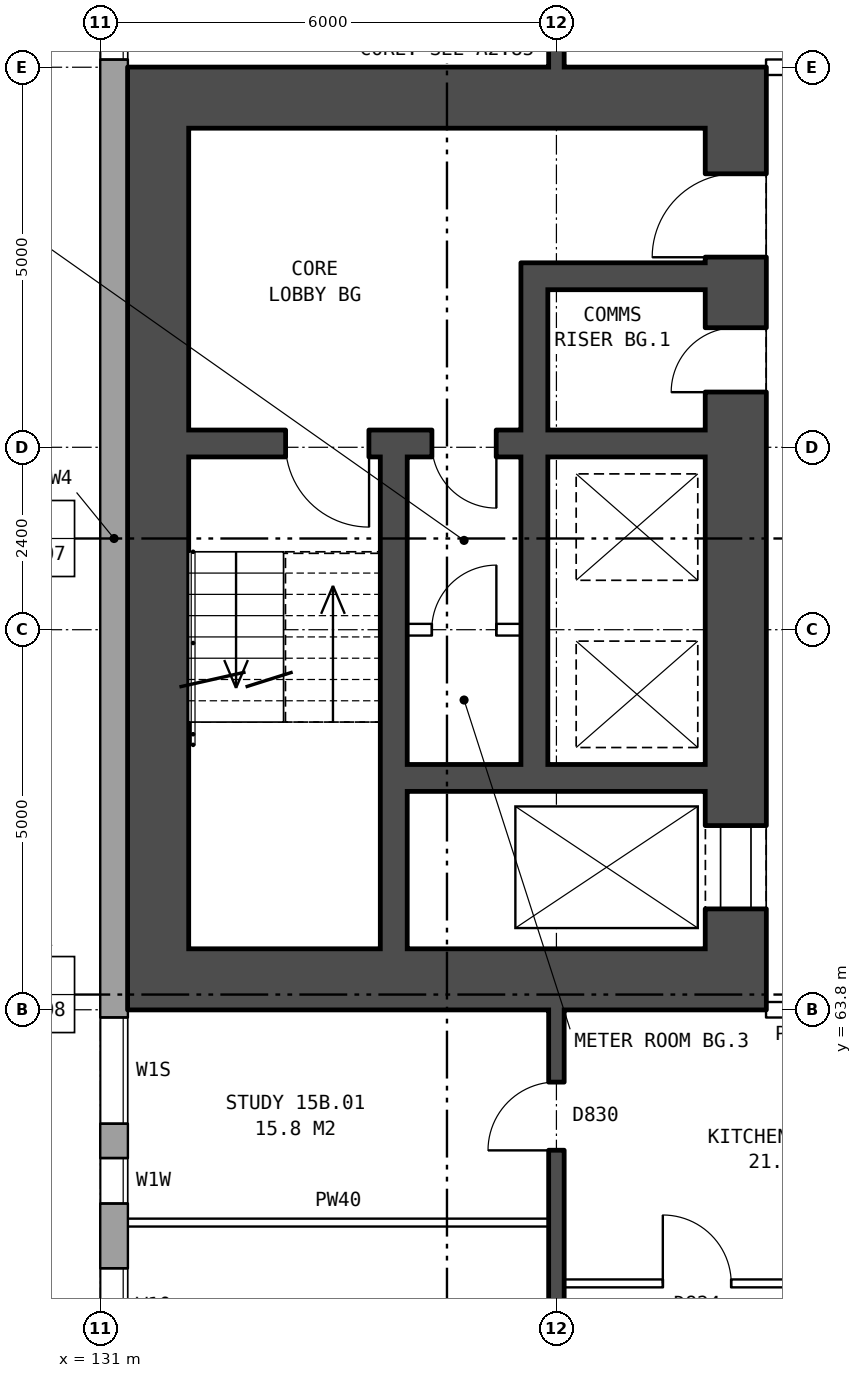
"""IFC4 building model, lengths in metres.
Left out: names, types, materials, properties, quantities, classifications, styles, units other than length and angle.
Written with IfcOpenShell. Run it as: python <this file> out.ifc"""

import sys

from ifc_helpers import new_model, si_unit, direction, frame, frame_2d, origin, place, context, subcontext, project, spatial, rectangle, extrude, element, fill, save


model = new_model("IFC4")
c1 = context("Model", 3, precision=1e-05, world=origin(), true_north=direction((0.0, 1.0)))
c2 = subcontext(c1, "Body", "Model", "MODEL_VIEW")
j1 = project(units=[si_unit("LENGTHUNIT", "METRE"), si_unit("PLANEANGLEUNIT", "RADIAN")], contexts=[c1])
p1 = place(None, origin())
s1 = spatial("IfcSite", under=j1, at=p1, CompositionType="ELEMENT")
p2 = place(p1, origin())
s2 = spatial("IfcBuilding", under=s1, at=p2, CompositionType="ELEMENT")
p3 = place(p2, frame((0.0, 0.0, 56.7)))
s3 = spatial("IfcBuildingStorey", under=s2, at=p3, CompositionType="ELEMENT", Elevation=56.7)
p4 = place(p3, frame((131.18, 82.925, 0.0), z_axis=(0.0, 0.0, 1.0), x_axis=(0.0, -1.0, 0.0)))
e1 = element("IfcWall", 1, at=p4, inside=s3, PredefinedType="STANDARD", context=c2, shape_type="SweptSolid", body=[
    extrude(rectangle(XDim=25.851, YDim=0.36, at=frame_2d((12.925, 0.0))), origin(), (0.0, 0.0, 1.0), 2.85),
])
p5 = place(p4, frame((1.075, 0.0, 0.8)))
e2 = element("IfcOpeningElement", 2, at=p5, cuts=e1, PredefinedType="OPENING", context=c2, shape_type="SweptSolid", body=[
    extrude(rectangle(XDim=1.2, YDim=1.8, at=frame_2d((0.6, 0.9))), frame((0.0, 0.19, 0.0), z_axis=(0.0, -1.0, 0.0), x_axis=(1.0, 0.0, 0.0)), (0.0, 0.0, 1.0), 0.38),
])
p6 = place(p4, frame((2.575, 0.0, 0.8)))
e3 = element("IfcOpeningElement", 3, at=p6, cuts=e1, PredefinedType="OPENING", context=c2, shape_type="SweptSolid", body=[
    extrude(rectangle(XDim=1.2, YDim=0.9, at=frame_2d((0.6, 0.45))), frame((0.0, 0.19, 0.0), z_axis=(0.0, -1.0, 0.0), x_axis=(1.0, 0.0, 0.0)), (0.0, 0.0, 1.0), 0.38),
])
p7 = place(p4, frame((19.225, 0.0, 1.65)))
e4 = element("IfcOpeningElement", 4, at=p7, cuts=e1, PredefinedType="OPENING", context=c2, shape_type="SweptSolid", body=[
    extrude(rectangle(XDim=1.4, YDim=0.9, at=frame_2d((0.7, 0.45))), frame((0.0, 0.19, 0.0), z_axis=(0.0, -1.0, 0.0), x_axis=(1.0, 0.0, 0.0)), (0.0, 0.0, 1.0), 0.38),
])
p8 = place(p4, frame((22.525, 0.0, 0.8)))
e5 = element("IfcOpeningElement", 5, at=p8, cuts=e1, PredefinedType="OPENING", context=c2, shape_type="SweptSolid", body=[
    extrude(rectangle(XDim=1.0, YDim=1.2, at=frame_2d((0.5, 0.6))), frame((0.0, 0.19, 0.0), z_axis=(0.0, -1.0, 0.0), x_axis=(1.0, 0.0, 0.0)), (0.0, 0.0, 1.0), 0.38),
])
p9 = place(p4, frame((5.025, 0.0, 1.7)))
e6 = element("IfcOpeningElement", 6, at=p9, cuts=e1, PredefinedType="OPENING", context=c2, shape_type="SweptSolid", body=[
    extrude(rectangle(XDim=1.6, YDim=0.9, at=frame_2d((0.8, 0.45))), frame((0.0, 0.19, 0.0), z_axis=(0.0, -1.0, 0.0), x_axis=(1.0, 0.0, 0.0)), (0.0, 0.0, 1.0), 0.38),
])
p10 = place(p4, frame((21.075, 0.0, 0.25)))
e7 = element("IfcOpeningElement", 7, at=p10, cuts=e1, PredefinedType="OPENING", context=c2, shape_type="SweptSolid", body=[
    extrude(rectangle(XDim=0.6, YDim=0.9, at=frame_2d((0.3, 0.45))), frame((0.0, 0.19, 0.0), z_axis=(0.0, -1.0, 0.0), x_axis=(1.0, 0.0, 0.0)), (0.0, 0.0, 1.0), 0.38),
])
p11 = place(p4, frame((23.825, 0.0, 0.8)))
e8 = element("IfcOpeningElement", 8, at=p11, cuts=e1, PredefinedType="OPENING", context=c2, shape_type="SweptSolid", body=[
    extrude(rectangle(XDim=1.4, YDim=1.8, at=frame_2d((0.7, 0.9))), frame((0.0, 0.19, 0.0), z_axis=(0.0, -1.0, 0.0), x_axis=(1.0, 0.0, 0.0)), (0.0, 0.0, 1.0), 0.38),
])
p12 = place(p3, frame((139.36, 64.6, 0.0), z_axis=(0.0, 0.0, 1.0), x_axis=(0.0, 1.0, 0.0)))
e9 = element("IfcWall", 9, at=p12, inside=s3, PredefinedType="SHEAR", context=c2, shape_type="SweptSolid", body=[
    extrude(rectangle(XDim=10.8, YDim=0.8, at=frame_2d((5.4, 0.0))), origin(), (0.0, 0.0, 1.0), 2.85),
])
p13 = place(p12, frame((0.525, 0.0, 0.0)))
e10 = element("IfcOpeningElement", 10, at=p13, cuts=e9, PredefinedType="OPENING", context=c2, shape_type="SweptSolid", body=[
    extrude(rectangle(XDim=1.1, YDim=2.1, at=frame_2d((0.55, 1.05))), frame((0.0, 0.41, 0.0), z_axis=(0.0, -1.0, 0.0), x_axis=(1.0, 0.0, 0.0)), (0.0, 0.0, 1.0), 0.82),
])
p14 = place(p12, frame((9.1, 0.0, 0.0)))
e11 = element("IfcOpeningElement", 11, at=p14, cuts=e9, PredefinedType="OPENING", context=c2, shape_type="SweptSolid", body=[
    extrude(rectangle(XDim=1.1, YDim=2.1, at=frame_2d((0.55, 1.05))), frame((0.0, 0.41, 0.0), z_axis=(0.0, -1.0, 0.0), x_axis=(1.0, 0.0, 0.0)), (0.0, 0.0, 1.0), 0.82),
])
p15 = place(p12, frame((7.325, 0.0, 0.0)))
e12 = element("IfcOpeningElement", 12, at=p15, cuts=e9, PredefinedType="OPENING", context=c2, shape_type="SweptSolid", body=[
    extrude(rectangle(XDim=0.85, YDim=2.1, at=frame_2d((0.425, 1.05))), frame((0.0, 0.41, 0.0), z_axis=(0.0, -1.0, 0.0), x_axis=(1.0, 0.0, 0.0)), (0.0, 0.0, 1.0), 0.82),
])
p16 = place(p3, frame((131.76, 64.6, 0.0), z_axis=(0.0, 0.0, 1.0), x_axis=(0.0, 1.0, 0.0)))
e13 = element("IfcWall", 13, at=p16, inside=s3, PredefinedType="SHEAR", context=c2, shape_type="SweptSolid", body=[
    extrude(rectangle(XDim=10.8, YDim=0.8, at=frame_2d((5.4, 0.0))), origin(), (0.0, 0.0, 1.0), 2.85),
])
for number, where, z_axis, x_axis in (
    (14, (139.76, 64.2, 0.0), (0.0, 0.0, 1.0), (-1.0, 0.0, 0.0)),
    (15, (139.76, 75.8, 0.0), (0.0, 0.0, 1.0), (-1.0, 0.0, 0.0)),
):
    element("IfcWall", number, at=place(p3, frame(where, z_axis=z_axis, x_axis=x_axis)), inside=s3, PredefinedType="SHEAR", context=c2, shape_type="SweptSolid", body=[
        extrude(rectangle(XDim=8.4, YDim=0.8, at=frame_2d((4.2, 0.0))), origin(), (0.0, 0.0, 1.0), 2.85),
    ])
p17 = place(p3, frame((138.96, 66.85, 0.0), z_axis=(0.0, 0.0, 1.0), x_axis=(-1.0, 0.0, 0.0)))
e16 = element("IfcWall", 16, at=p17, inside=s3, PredefinedType="SHEAR", context=c2, shape_type="SweptSolid", body=[
    extrude(rectangle(XDim=3.925, YDim=0.35, at=frame_2d((1.962, 0.0))), origin(), (0.0, 0.0, 1.0), 2.85),
])
p18 = place(p3, frame((136.535, 68.8, 0.0), z_axis=(0.0, 0.0, 1.0), x_axis=(-1.0, 0.0, 0.0)))
e17 = element("IfcWall", 17, at=p18, inside=s3, PredefinedType="PARTITIONING", context=c2, shape_type="SweptSolid", body=[
    extrude(rectangle(XDim=1.5, YDim=0.15, at=frame_2d((0.75, 0.0))), origin(), (0.0, 0.0, 1.0), 2.85),
])
p19 = place(p18, frame((0.325, 0.0, 0.0)))
e18 = element("IfcOpeningElement", 18, at=p19, cuts=e17, PredefinedType="OPENING", context=c2, shape_type="SweptSolid", body=[
    extrude(rectangle(XDim=0.85, YDim=2.1, at=frame_2d((0.425, 1.05))), frame((0.0, 0.085, 0.0), z_axis=(0.0, -1.0, 0.0), x_axis=(1.0, 0.0, 0.0)), (0.0, 0.0, 1.0), 0.17),
])
p20 = place(p3, frame((138.96, 71.25, 0.0), z_axis=(0.0, 0.0, 1.0), x_axis=(-1.0, 0.0, 0.0)))
e19 = element("IfcWall", 19, at=p20, inside=s3, PredefinedType="SHEAR", context=c2, shape_type="SweptSolid", body=[
    extrude(rectangle(XDim=6.8, YDim=0.35, at=frame_2d((3.4, 0.0))), origin(), (0.0, 0.0, 1.0), 2.85),
])
p21 = place(p20, frame((4.425, 0.0, 0.0)))
e20 = element("IfcOpeningElement", 20, at=p21, cuts=e19, PredefinedType="OPENING", context=c2, shape_type="SweptSolid", body=[
    extrude(rectangle(XDim=1.1, YDim=2.1, at=frame_2d((0.55, 1.05))), frame((0.0, 0.185, 0.0), z_axis=(0.0, -1.0, 0.0), x_axis=(1.0, 0.0, 0.0)), (0.0, 0.0, 1.0), 0.37),
])
p22 = place(p20, frame((2.75, 0.0, 0.0)))
e21 = element("IfcOpeningElement", 21, at=p22, cuts=e19, PredefinedType="OPENING", context=c2, shape_type="SweptSolid", body=[
    extrude(rectangle(XDim=0.85, YDim=2.1, at=frame_2d((0.425, 1.05))), frame((0.0, 0.185, 0.0), z_axis=(0.0, -1.0, 0.0), x_axis=(1.0, 0.0, 0.0)), (0.0, 0.0, 1.0), 0.37),
])
p23 = place(p3, frame((138.96, 73.45, 0.0), z_axis=(0.0, 0.0, 1.0), x_axis=(-1.0, 0.0, 0.0)))
e22 = element("IfcWall", 22, at=p23, inside=s3, PredefinedType="SHEAR", context=c2, shape_type="SweptSolid", body=[
    extrude(rectangle(XDim=2.075, YDim=0.35, at=frame_2d((1.038, 0.0))), origin(), (0.0, 0.0, 1.0), 2.85),
])
p24 = place(p3, frame((136.71, 67.025, 0.0), z_axis=(0.0, 0.0, 1.0), x_axis=(0.0, 1.0, 0.0)))
e23 = element("IfcWall", 23, at=p24, inside=s3, PredefinedType="SHEAR", context=c2, shape_type="SweptSolid", body=[
    extrude(rectangle(XDim=4.05, YDim=0.35, at=frame_2d((2.025, 0.0))), origin(), (0.0, 0.0, 1.0), 2.85),
])
p25 = place(p3, frame((136.71, 71.425, 0.0), z_axis=(0.0, 0.0, 1.0), x_axis=(0.0, 1.0, 0.0)))
e24 = element("IfcWall", 24, at=p25, inside=s3, PredefinedType="SHEAR", context=c2, shape_type="SweptSolid", body=[
    extrude(rectangle(XDim=2.2, YDim=0.35, at=frame_2d((1.1, 0.0))), origin(), (0.0, 0.0, 1.0), 2.85),
])
p26 = place(p3, frame((134.86, 64.6, 0.0), z_axis=(0.0, 0.0, 1.0), x_axis=(0.0, 1.0, 0.0)))
e25 = element("IfcWall", 25, at=p26, inside=s3, PredefinedType="SHEAR", context=c2, shape_type="SweptSolid", body=[
    extrude(rectangle(XDim=6.475, YDim=0.35, at=frame_2d((3.237, 0.0))), origin(), (0.0, 0.0, 1.0), 2.85),
])
p27 = place(p3, frame((137.1, 60.2, 0.0), z_axis=(0.0, 0.0, 1.0), x_axis=(1.0, 0.0, 0.0)))
e26 = element("IfcWall", 26, at=p27, inside=s3, PredefinedType="PARTITIONING", context=c2, shape_type="SweptSolid", body=[
    extrude(rectangle(XDim=5.8, YDim=0.1, at=frame_2d((2.9, 0.0))), origin(), (0.0, 0.0, 1.0), 2.85),
])
p28 = place(p27, frame((1.3, 0.0, 0.0)))
e27 = element("IfcOpeningElement", 27, at=p28, cuts=e26, PredefinedType="OPENING", context=c2, shape_type="SweptSolid", body=[
    extrude(rectangle(XDim=0.9, YDim=2.1, at=frame_2d((0.45, 1.05))), frame((0.0, 0.06, 0.0), z_axis=(0.0, -1.0, 0.0), x_axis=(1.0, 0.0, 0.0)), (0.0, 0.0, 1.0), 0.12),
])
p29 = place(p27, frame((4.2, 0.0, 0.0)))
e28 = element("IfcOpeningElement", 28, at=p29, cuts=e26, PredefinedType="OPENING", context=c2, shape_type="SweptSolid", body=[
    extrude(rectangle(XDim=0.9, YDim=2.1, at=frame_2d((0.45, 1.05))), frame((0.0, 0.06, 0.0), z_axis=(0.0, -1.0, 0.0), x_axis=(1.0, 0.0, 0.0)), (0.0, 0.0, 1.0), 0.12),
])
p30 = place(p3, frame((131.36, 61.0, 0.0), z_axis=(0.0, 0.0, 1.0), x_axis=(1.0, 0.0, 0.0)))
e29 = element("IfcWall", 29, at=p30, inside=s3, PredefinedType="PARTITIONING", context=c2, shape_type="SweptSolid", body=[
    extrude(rectangle(XDim=5.54, YDim=0.1, at=frame_2d((2.77, 0.0))), origin(), (0.0, 0.0, 1.0), 2.85),
])
p31 = place(p3, frame((139.76, 63.8, 0.0), z_axis=(0.0, 0.0, 1.0), x_axis=(1.0, 0.0, 0.0)))
e30 = element("IfcWall", 30, at=p31, inside=s3, PredefinedType="PARTITIONING", context=c2, shape_type="SweptSolid", body=[
    extrude(rectangle(XDim=3.0, YDim=0.2, at=frame_2d((1.5, 0.0))), origin(), (0.0, 0.0, 1.0), 2.85),
])
p32 = place(p31, frame((1.0, 0.0, 0.0)))
e31 = element("IfcOpeningElement", 31, at=p32, cuts=e30, PredefinedType="OPENING", context=c2, shape_type="SweptSolid", body=[
    extrude(rectangle(XDim=1.0, YDim=2.1, at=frame_2d((0.5, 1.05))), frame((0.0, 0.11, 0.0), z_axis=(0.0, -1.0, 0.0), x_axis=(1.0, 0.0, 0.0)), (0.0, 0.0, 1.0), 0.22),
])
p33 = place(p3, frame((139.76, 76.2, 0.0), z_axis=(0.0, 0.0, 1.0), x_axis=(1.0, 0.0, 0.0)))
e32 = element("IfcWall", 32, at=p33, inside=s3, PredefinedType="PARTITIONING", context=c2, shape_type="SweptSolid", body=[
    extrude(rectangle(XDim=3.0, YDim=0.2, at=frame_2d((1.5, 0.0))), origin(), (0.0, 0.0, 1.0), 2.85),
])
p34 = place(p33, frame((1.0, 0.0, 0.0)))
e33 = element("IfcOpeningElement", 33, at=p34, cuts=e32, PredefinedType="OPENING", context=c2, shape_type="SweptSolid", body=[
    extrude(rectangle(XDim=1.0, YDim=2.1, at=frame_2d((0.5, 1.05))), frame((0.0, 0.11, 0.0), z_axis=(0.0, -1.0, 0.0), x_axis=(1.0, 0.0, 0.0)), (0.0, 0.0, 1.0), 0.22),
])
p35 = place(p3, frame((137.0, 54.36, 0.0), z_axis=(0.0, 0.0, 1.0), x_axis=(0.0, 1.0, 0.0)))
e34 = element("IfcWall", 34, at=p35, inside=s3, PredefinedType="SOLIDWALL", context=c2, shape_type="SweptSolid", body=[
    extrude(rectangle(XDim=9.44, YDim=0.2, at=frame_2d((4.72, 0.0))), origin(), (0.0, 0.0, 1.0), 2.85),
])
p36 = place(p35, frame((2.47, 0.0, 0.0)))
e35 = element("IfcOpeningElement", 35, at=p36, cuts=e34, PredefinedType="OPENING", context=c2, shape_type="SweptSolid", body=[
    extrude(rectangle(XDim=0.9, YDim=2.1, at=frame_2d((0.45, 1.05))), frame((0.0, 0.11, 0.0), z_axis=(0.0, -1.0, 0.0), x_axis=(1.0, 0.0, 0.0)), (0.0, 0.0, 1.0), 0.22),
])
p37 = place(p35, frame((7.59, 0.0, 0.0)))
e36 = element("IfcOpeningElement", 36, at=p37, cuts=e34, PredefinedType="OPENING", context=c2, shape_type="SweptSolid", body=[
    extrude(rectangle(XDim=0.9, YDim=2.1, at=frame_2d((0.45, 1.05))), frame((0.0, 0.11, 0.0), z_axis=(0.0, -1.0, 0.0), x_axis=(1.0, 0.0, 0.0)), (0.0, 0.0, 1.0), 0.22),
])
p38 = place(p3, frame((137.0, 76.2, 0.0), z_axis=(0.0, 0.0, 1.0), x_axis=(0.0, 1.0, 0.0)))
e37 = element("IfcWall", 37, at=p38, inside=s3, PredefinedType="SOLIDWALL", context=c2, shape_type="SweptSolid", body=[
    extrude(rectangle(XDim=9.44, YDim=0.2, at=frame_2d((4.72, 0.0))), origin(), (0.0, 0.0, 1.0), 2.85),
])
p39 = place(p38, frame((1.5, 0.0, 0.0)))
e38 = element("IfcOpeningElement", 38, at=p39, cuts=e37, PredefinedType="OPENING", context=c2, shape_type="SweptSolid", body=[
    extrude(rectangle(XDim=0.9, YDim=2.1, at=frame_2d((0.45, 1.05))), frame((0.0, 0.11, 0.0), z_axis=(0.0, -1.0, 0.0), x_axis=(1.0, 0.0, 0.0)), (0.0, 0.0, 1.0), 0.22),
])
p40 = place(p7, origin())
e39 = element("IfcWindow", 39, at=p40, inside=s3, PartitioningType="SINGLE_PANEL", PredefinedType="WINDOW", context=c2, shape_type="SweptSolid", body=[
    extrude(rectangle(XDim=1.4, YDim=0.9, at=frame_2d((0.7, 0.45))), frame((0.0, 0.15, 0.0), z_axis=(0.0, -1.0, 0.0), x_axis=(1.0, 0.0, 0.0)), (0.0, 0.0, 1.0), 0.06),
])
fill(e4, e39)
p41 = place(p8, origin())
e40 = element("IfcWindow", 40, at=p41, inside=s3, PartitioningType="SINGLE_PANEL", PredefinedType="WINDOW", context=c2, shape_type="SweptSolid", body=[
    extrude(rectangle(XDim=1.0, YDim=1.2, at=frame_2d((0.5, 0.6))), frame((0.0, 0.15, 0.0), z_axis=(0.0, -1.0, 0.0), x_axis=(1.0, 0.0, 0.0)), (0.0, 0.0, 1.0), 0.06),
])
fill(e5, e40)
p42 = place(p13, origin())
e41 = element("IfcDoor", 41, at=p42, inside=s3, OperationType="DOUBLE_DOOR_SLIDING", PredefinedType="DOOR", context=c2, shape_type="SweptSolid", body=[
    extrude(rectangle(XDim=1.1, YDim=2.1, at=frame_2d((0.55, 1.05))), frame((0.0, 0.385, 0.0), z_axis=(0.0, -1.0, 0.0), x_axis=(1.0, 0.0, 0.0)), (0.0, 0.0, 1.0), 0.05),
])
fill(e10, e41)
p43 = place(p14, origin())
e42 = element("IfcDoor", 42, at=p43, inside=s3, OperationType="SINGLE_SWING_LEFT", PredefinedType="DOOR", context=c2, shape_type="SweptSolid", body=[
    extrude(rectangle(XDim=1.1, YDim=2.1, at=frame_2d((0.55, 1.05))), frame((0.0, 0.385, 0.0), z_axis=(0.0, -1.0, 0.0), x_axis=(1.0, 0.0, 0.0)), (0.0, 0.0, 1.0), 0.05),
])
fill(e11, e42)
p44 = place(p21, origin())
e43 = element("IfcDoor", 43, at=p44, inside=s3, OperationType="SINGLE_SWING_LEFT", PredefinedType="DOOR", context=c2, shape_type="SweptSolid", body=[
    extrude(rectangle(XDim=1.1, YDim=2.1, at=frame_2d((0.55, 1.05))), frame((0.0, 0.025, 0.0), z_axis=(0.0, -1.0, 0.0), x_axis=(1.0, 0.0, 0.0)), (0.0, 0.0, 1.0), 0.05),
])
fill(e20, e43)
p45 = place(p15, origin())
e44 = element("IfcDoor", 44, at=p45, inside=s3, OperationType="SINGLE_SWING_LEFT", PredefinedType="DOOR", context=c2, shape_type="SweptSolid", body=[
    extrude(rectangle(XDim=0.85, YDim=2.1, at=frame_2d((0.425, 1.05))), frame((0.0, 0.385, 0.0), z_axis=(0.0, -1.0, 0.0), x_axis=(1.0, 0.0, 0.0)), (0.0, 0.0, 1.0), 0.05),
])
fill(e12, e44)
p46 = place(p22, origin())
e45 = element("IfcDoor", 45, at=p46, inside=s3, OperationType="SINGLE_SWING_LEFT", PredefinedType="DOOR", context=c2, shape_type="SweptSolid", body=[
    extrude(rectangle(XDim=0.85, YDim=2.1, at=frame_2d((0.425, 1.05))), frame((0.0, 0.025, 0.0), z_axis=(0.0, -1.0, 0.0), x_axis=(1.0, 0.0, 0.0)), (0.0, 0.0, 1.0), 0.05),
])
fill(e21, e45)
p47 = place(p19, frame((0.85, 0.0, 0.0), z_axis=(0.0, 0.0, 1.0), x_axis=(-1.0, 0.0, 0.0)))
e46 = element("IfcDoor", 46, at=p47, inside=s3, OperationType="SINGLE_SWING_RIGHT", PredefinedType="DOOR", context=c2, shape_type="SweptSolid", body=[
    extrude(rectangle(XDim=0.85, YDim=2.1, at=frame_2d((0.425, 1.05))), frame((0.0, 0.025, 0.0), z_axis=(0.0, -1.0, 0.0), x_axis=(1.0, 0.0, 0.0)), (0.0, 0.0, 1.0), 0.05),
])
fill(e18, e46)
p48 = place(p37, origin())
e47 = element("IfcDoor", 47, at=p48, inside=s3, OperationType="SINGLE_SWING_LEFT", PredefinedType="DOOR", context=c2, shape_type="SweptSolid", body=[
    extrude(rectangle(XDim=0.9, YDim=2.1, at=frame_2d((0.45, 1.05))), frame((0.0, 0.025, 0.0), z_axis=(0.0, -1.0, 0.0), x_axis=(1.0, 0.0, 0.0)), (0.0, 0.0, 1.0), 0.05),
])
fill(e36, e47)
p49 = place(p28, origin())
e48 = element("IfcDoor", 48, at=p49, inside=s3, OperationType="SINGLE_SWING_LEFT", PredefinedType="DOOR", context=c2, shape_type="SweptSolid", body=[
    extrude(rectangle(XDim=0.9, YDim=2.1, at=frame_2d((0.45, 1.05))), frame((0.0, 0.025, 0.0), z_axis=(0.0, -1.0, 0.0), x_axis=(1.0, 0.0, 0.0)), (0.0, 0.0, 1.0), 0.05),
])
fill(e27, e48)
p50 = place(p9, origin())
e49 = element("IfcWindow", 49, at=p50, inside=s3, PartitioningType="SINGLE_PANEL", PredefinedType="WINDOW", context=c2, shape_type="SweptSolid", body=[
    extrude(rectangle(XDim=1.6, YDim=0.9, at=frame_2d((0.8, 0.45))), frame((0.0, 0.15, 0.0), z_axis=(0.0, -1.0, 0.0), x_axis=(1.0, 0.0, 0.0)), (0.0, 0.0, 1.0), 0.06),
])
fill(e6, e49)
p51 = place(p10, origin())
e50 = element("IfcWindow", 50, at=p51, inside=s3, PartitioningType="SINGLE_PANEL", PredefinedType="WINDOW", context=c2, shape_type="SweptSolid", body=[
    extrude(rectangle(XDim=0.6, YDim=0.9, at=frame_2d((0.3, 0.45))), frame((0.0, 0.15, 0.0), z_axis=(0.0, -1.0, 0.0), x_axis=(1.0, 0.0, 0.0)), (0.0, 0.0, 1.0), 0.06),
])
fill(e7, e50)
save(model, sys.argv[1])
